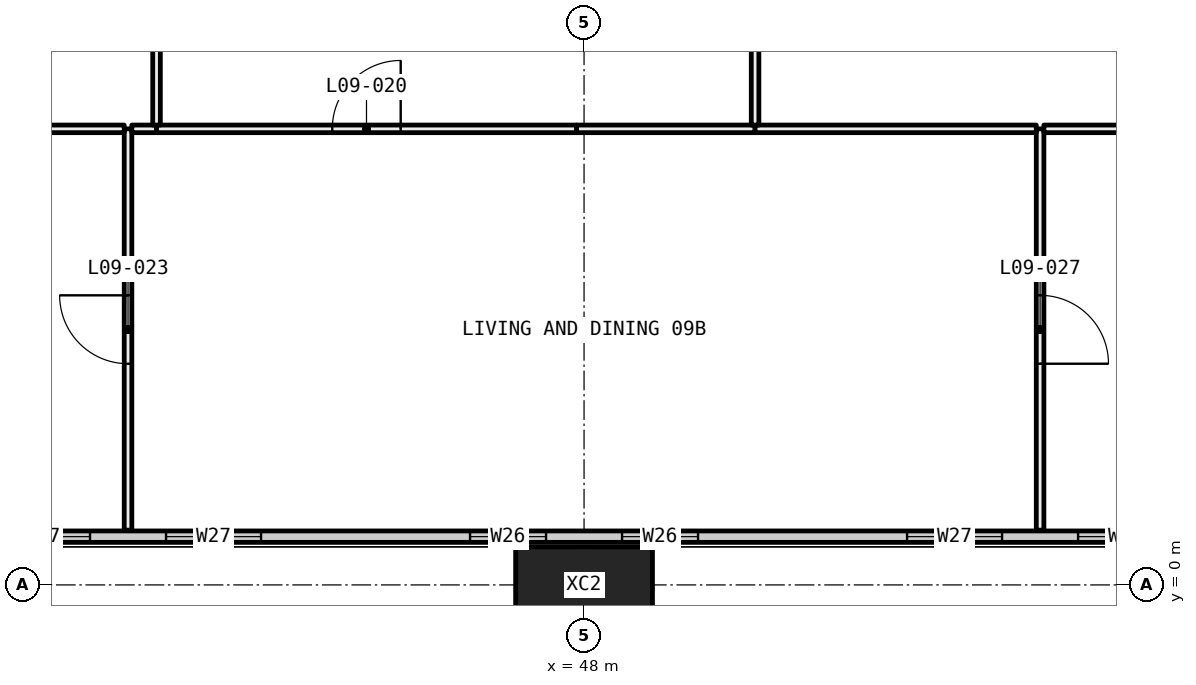
"""IFC4 building model, lengths in metres.
Left out: names, types, materials, properties, quantities, classifications, styles, units other than length and angle.
Written with IfcOpenShell. Run it as: python <this file> out.ifc"""

import sys

from ifc_helpers import new_model, si_unit, direction, frame, frame_2d, origin, origin_2d, place, context, subcontext, project, spatial, rectangle, hollow_rectangle, extrude, element, fill, save


model = new_model("IFC4")
c1 = context("Model", 3, precision=1e-05, world=origin(), true_north=direction((0.0, 1.0)))
c2 = subcontext(c1, "Body", "Model", "MODEL_VIEW")
j1 = project(units=[si_unit("LENGTHUNIT", "METRE"), si_unit("PLANEANGLEUNIT", "RADIAN")], contexts=[c1])
p1 = place(None, origin())
s1 = spatial("IfcSite", under=j1, at=p1, CompositionType="ELEMENT")
p2 = place(p1, origin())
s2 = spatial("IfcBuilding", under=s1, at=p2, CompositionType="ELEMENT")
p3 = place(p2, frame((0.0, 0.0, 43.8)))
s3 = spatial("IfcBuildingStorey", under=s2, at=p3, CompositionType="ELEMENT", Elevation=43.8)
p4 = place(p3, frame((48.0, 0.0, -0.4), z_axis=(0.0, 0.0, 1.0), x_axis=(1.0, 0.0, 0.0)))
e1 = element("IfcColumn", 1, at=p4, inside=s3, PredefinedType="COLUMN", context=c2, shape_type="SweptSolid", body=[
    extrude(hollow_rectangle(XDim=1.8, YDim=1.0, WallThickness=0.07, at=origin_2d()), origin(), (0.0, 0.0, 1.0), 3.45),
])
p5 = place(p3, frame((6.56, 0.635, 0.0), z_axis=(0.0, 0.0, 1.0), x_axis=(1.0, 0.0, 0.0)))
e2 = element("IfcWall", 2, at=p5, inside=s3, PredefinedType="ELEMENTEDWALL", context=c2, shape_type="SweptSolid", body=[
    extrude(rectangle(XDim=58.88, YDim=0.15, at=frame_2d((29.44, 0.0))), origin(), (0.0, 0.0, 1.0), 3.05),
])
p6 = place(p5, frame((0.44, 0.0, 0.45)))
e3 = element("IfcOpeningElement", 3, at=p6, cuts=e2, PredefinedType="OPENING", context=c2, shape_type="SweptSolid", body=[
    extrude(rectangle(XDim=4.5, YDim=2.55, at=frame_2d((2.25, 1.275))), frame((0.0, 0.085, 0.0), z_axis=(0.0, -1.0, 0.0), x_axis=(1.0, 0.0, 0.0)), (0.0, 0.0, 1.0), 0.17),
])
p7 = place(p5, frame((5.94, 0.0, 0.45)))
e4 = element("IfcOpeningElement", 4, at=p7, cuts=e2, PredefinedType="OPENING", context=c2, shape_type="SweptSolid", body=[
    extrude(rectangle(XDim=1.0, YDim=2.55, at=frame_2d((0.5, 1.275))), frame((0.0, 0.085, 0.0), z_axis=(0.0, -1.0, 0.0), x_axis=(1.0, 0.0, 0.0)), (0.0, 0.0, 1.0), 0.17),
])
p8 = place(p5, frame((9.69, 0.0, 0.45)))
e5 = element("IfcOpeningElement", 5, at=p8, cuts=e2, PredefinedType="OPENING", context=c2, shape_type="SweptSolid", body=[
    extrude(rectangle(XDim=1.25, YDim=2.55, at=frame_2d((0.625, 1.275))), frame((0.0, 0.085, 0.0), z_axis=(0.0, -1.0, 0.0), x_axis=(1.0, 0.0, 0.0)), (0.0, 0.0, 1.0), 0.17),
])
p9 = place(p5, frame((11.94, 0.0, 0.45)))
e6 = element("IfcOpeningElement", 6, at=p9, cuts=e2, PredefinedType="OPENING", context=c2, shape_type="SweptSolid", body=[
    extrude(rectangle(XDim=1.25, YDim=2.55, at=frame_2d((0.625, 1.275))), frame((0.0, 0.085, 0.0), z_axis=(0.0, -1.0, 0.0), x_axis=(1.0, 0.0, 0.0)), (0.0, 0.0, 1.0), 0.17),
])
p10 = place(p5, frame((15.94, 0.0, 0.45)))
e7 = element("IfcOpeningElement", 7, at=p10, cuts=e2, PredefinedType="OPENING", context=c2, shape_type="SweptSolid", body=[
    extrude(rectangle(XDim=1.0, YDim=2.55, at=frame_2d((0.5, 1.275))), frame((0.0, 0.085, 0.0), z_axis=(0.0, -1.0, 0.0), x_axis=(1.0, 0.0, 0.0)), (0.0, 0.0, 1.0), 0.17),
])
p11 = place(p5, frame((17.94, 0.0, 0.45)))
e8 = element("IfcOpeningElement", 8, at=p11, cuts=e2, PredefinedType="OPENING", context=c2, shape_type="SweptSolid", body=[
    extrude(rectangle(XDim=1.0, YDim=2.55, at=frame_2d((0.5, 1.275))), frame((0.0, 0.085, 0.0), z_axis=(0.0, -1.0, 0.0), x_axis=(1.0, 0.0, 0.0)), (0.0, 0.0, 1.0), 0.17),
])
p12 = place(p5, frame((21.69, 0.0, 0.45)))
e9 = element("IfcOpeningElement", 9, at=p12, cuts=e2, PredefinedType="OPENING", context=c2, shape_type="SweptSolid", body=[
    extrude(rectangle(XDim=1.25, YDim=2.55, at=frame_2d((0.625, 1.275))), frame((0.0, 0.085, 0.0), z_axis=(0.0, -1.0, 0.0), x_axis=(1.0, 0.0, 0.0)), (0.0, 0.0, 1.0), 0.17),
])
p13 = place(p5, frame((23.94, 0.0, 0.45)))
e10 = element("IfcOpeningElement", 10, at=p13, cuts=e2, PredefinedType="OPENING", context=c2, shape_type="SweptSolid", body=[
    extrude(rectangle(XDim=1.25, YDim=2.55, at=frame_2d((0.625, 1.275))), frame((0.0, 0.085, 0.0), z_axis=(0.0, -1.0, 0.0), x_axis=(1.0, 0.0, 0.0)), (0.0, 0.0, 1.0), 0.17),
])
p14 = place(p5, frame((27.94, 0.0, 0.45)))
e11 = element("IfcOpeningElement", 11, at=p14, cuts=e2, PredefinedType="OPENING", context=c2, shape_type="SweptSolid", body=[
    extrude(rectangle(XDim=1.0, YDim=2.55, at=frame_2d((0.5, 1.275))), frame((0.0, 0.085, 0.0), z_axis=(0.0, -1.0, 0.0), x_axis=(1.0, 0.0, 0.0)), (0.0, 0.0, 1.0), 0.17),
])
p15 = place(p5, frame((29.94, 0.0, 0.45)))
e12 = element("IfcOpeningElement", 12, at=p15, cuts=e2, PredefinedType="OPENING", context=c2, shape_type="SweptSolid", body=[
    extrude(rectangle(XDim=1.0, YDim=2.55, at=frame_2d((0.5, 1.275))), frame((0.0, 0.085, 0.0), z_axis=(0.0, -1.0, 0.0), x_axis=(1.0, 0.0, 0.0)), (0.0, 0.0, 1.0), 0.17),
])
p16 = place(p5, frame((33.69, 0.0, 0.45)))
e13 = element("IfcOpeningElement", 13, at=p16, cuts=e2, PredefinedType="OPENING", context=c2, shape_type="SweptSolid", body=[
    extrude(rectangle(XDim=1.25, YDim=2.55, at=frame_2d((0.625, 1.275))), frame((0.0, 0.085, 0.0), z_axis=(0.0, -1.0, 0.0), x_axis=(1.0, 0.0, 0.0)), (0.0, 0.0, 1.0), 0.17),
])
p17 = place(p5, frame((35.94, 0.0, 0.45)))
e14 = element("IfcOpeningElement", 14, at=p17, cuts=e2, PredefinedType="OPENING", context=c2, shape_type="SweptSolid", body=[
    extrude(rectangle(XDim=1.25, YDim=2.55, at=frame_2d((0.625, 1.275))), frame((0.0, 0.085, 0.0), z_axis=(0.0, -1.0, 0.0), x_axis=(1.0, 0.0, 0.0)), (0.0, 0.0, 1.0), 0.17),
])
p18 = place(p5, frame((39.94, 0.0, 0.45)))
e15 = element("IfcOpeningElement", 15, at=p18, cuts=e2, PredefinedType="OPENING", context=c2, shape_type="SweptSolid", body=[
    extrude(rectangle(XDim=1.0, YDim=2.55, at=frame_2d((0.5, 1.275))), frame((0.0, 0.085, 0.0), z_axis=(0.0, -1.0, 0.0), x_axis=(1.0, 0.0, 0.0)), (0.0, 0.0, 1.0), 0.17),
])
p19 = place(p5, frame((41.94, 0.0, 0.45)))
e16 = element("IfcOpeningElement", 16, at=p19, cuts=e2, PredefinedType="OPENING", context=c2, shape_type="SweptSolid", body=[
    extrude(rectangle(XDim=1.0, YDim=2.55, at=frame_2d((0.5, 1.275))), frame((0.0, 0.085, 0.0), z_axis=(0.0, -1.0, 0.0), x_axis=(1.0, 0.0, 0.0)), (0.0, 0.0, 1.0), 0.17),
])
p20 = place(p5, frame((45.69, 0.0, 0.45)))
e17 = element("IfcOpeningElement", 17, at=p20, cuts=e2, PredefinedType="OPENING", context=c2, shape_type="SweptSolid", body=[
    extrude(rectangle(XDim=1.25, YDim=2.55, at=frame_2d((0.625, 1.275))), frame((0.0, 0.085, 0.0), z_axis=(0.0, -1.0, 0.0), x_axis=(1.0, 0.0, 0.0)), (0.0, 0.0, 1.0), 0.17),
])
p21 = place(p5, frame((47.94, 0.0, 0.45)))
e18 = element("IfcOpeningElement", 18, at=p21, cuts=e2, PredefinedType="OPENING", context=c2, shape_type="SweptSolid", body=[
    extrude(rectangle(XDim=1.25, YDim=2.55, at=frame_2d((0.625, 1.275))), frame((0.0, 0.085, 0.0), z_axis=(0.0, -1.0, 0.0), x_axis=(1.0, 0.0, 0.0)), (0.0, 0.0, 1.0), 0.17),
])
p22 = place(p5, frame((51.94, 0.0, 0.45)))
e19 = element("IfcOpeningElement", 19, at=p22, cuts=e2, PredefinedType="OPENING", context=c2, shape_type="SweptSolid", body=[
    extrude(rectangle(XDim=1.0, YDim=2.55, at=frame_2d((0.5, 1.275))), frame((0.0, 0.085, 0.0), z_axis=(0.0, -1.0, 0.0), x_axis=(1.0, 0.0, 0.0)), (0.0, 0.0, 1.0), 0.17),
])
p23 = place(p5, frame((53.94, 0.0, 0.45)))
e20 = element("IfcOpeningElement", 20, at=p23, cuts=e2, PredefinedType="OPENING", context=c2, shape_type="SweptSolid", body=[
    extrude(rectangle(XDim=4.5, YDim=2.55, at=frame_2d((2.25, 1.275))), frame((0.0, 0.085, 0.0), z_axis=(0.0, -1.0, 0.0), x_axis=(1.0, 0.0, 0.0)), (0.0, 0.0, 1.0), 0.17),
])
p24 = place(p3, frame((42.0, 0.72, 0.0), z_axis=(0.0, 0.0, 1.0), x_axis=(0.0, 1.0, 0.0)))
e21 = element("IfcWall", 21, at=p24, inside=s3, PredefinedType="PARTITIONING", context=c2, shape_type="SweptSolid", body=[
    extrude(rectangle(XDim=5.28, YDim=0.1, at=frame_2d((2.64, 0.0))), origin(), (0.0, 0.0, 1.0), 3.05),
])
p25 = place(p24, frame((2.19, 0.0, 0.0)))
e22 = element("IfcOpeningElement", 22, at=p25, cuts=e21, PredefinedType="OPENING", context=c2, shape_type="SweptSolid", body=[
    extrude(rectangle(XDim=0.9, YDim=2.1, at=frame_2d((0.45, 1.05))), frame((0.0, 0.06, 0.0), z_axis=(0.0, -1.0, 0.0), x_axis=(1.0, 0.0, 0.0)), (0.0, 0.0, 1.0), 0.12),
])
p26 = place(p3, frame((41.95, 6.0, 0.0), z_axis=(0.0, 0.0, 1.0), x_axis=(-1.0, 0.0, 0.0)))
e23 = element("IfcWall", 23, at=p26, inside=s3, PredefinedType="PARTITIONING", context=c2, shape_type="SweptSolid", body=[
    extrude(rectangle(XDim=5.9, YDim=0.1, at=frame_2d((2.95, 0.0))), origin(), (0.0, 0.0, 1.0), 2.45),
])
p27 = place(p3, frame((54.0, 0.72, 0.0), z_axis=(0.0, 0.0, 1.0), x_axis=(0.0, 1.0, 0.0)))
e24 = element("IfcWall", 24, at=p27, inside=s3, PredefinedType="PARTITIONING", context=c2, shape_type="SweptSolid", body=[
    extrude(rectangle(XDim=5.28, YDim=0.1, at=frame_2d((2.64, 0.0))), origin(), (0.0, 0.0, 1.0), 3.05),
])
p28 = place(p27, frame((2.19, 0.0, 0.0)))
e25 = element("IfcOpeningElement", 25, at=p28, cuts=e24, PredefinedType="OPENING", context=c2, shape_type="SweptSolid", body=[
    extrude(rectangle(XDim=0.9, YDim=2.1, at=frame_2d((0.45, 1.05))), frame((0.0, 0.06, 0.0), z_axis=(0.0, -1.0, 0.0), x_axis=(1.0, 0.0, 0.0)), (0.0, 0.0, 1.0), 0.12),
])
p29 = place(p3, frame((42.375, 6.0, 0.0), z_axis=(0.0, 0.0, 1.0), x_axis=(-1.0, 0.0, 0.0)))
e26 = element("IfcWall", 26, at=p29, inside=s3, PredefinedType="PARTITIONING", context=c2, shape_type="SweptSolid", body=[
    extrude(rectangle(XDim=0.325, YDim=0.1, at=frame_2d((0.163, 0.0))), origin(), (0.0, 0.0, 1.0), 3.05),
])
p30 = place(p3, frame((50.25, 6.0, 0.0), z_axis=(0.0, 0.0, 1.0), x_axis=(-1.0, 0.0, 0.0)))
e27 = element("IfcWall", 27, at=p30, inside=s3, PredefinedType="PARTITIONING", context=c2, shape_type="SweptSolid", body=[
    extrude(rectangle(XDim=2.35, YDim=0.1, at=frame_2d((1.175, 0.0))), origin(), (0.0, 0.0, 1.0), 2.45),
])
p31 = place(p3, frame((47.9, 6.0, 0.0), z_axis=(0.0, 0.0, 1.0), x_axis=(-1.0, 0.0, 0.0)))
e28 = element("IfcWall", 28, at=p31, inside=s3, PredefinedType="PARTITIONING", context=c2, shape_type="SweptSolid", body=[
    extrude(rectangle(XDim=5.525, YDim=0.1, at=frame_2d((2.762, 0.0))), origin(), (0.0, 0.0, 1.0), 3.05),
])
p32 = place(p31, frame((2.312, 0.0, 0.0)))
e29 = element("IfcOpeningElement", 29, at=p32, cuts=e28, PredefinedType="OPENING", context=c2, shape_type="SweptSolid", body=[
    extrude(rectangle(XDim=0.9, YDim=2.1, at=frame_2d((0.45, 1.05))), frame((0.0, 0.06, 0.0), z_axis=(0.0, -1.0, 0.0), x_axis=(1.0, 0.0, 0.0)), (0.0, 0.0, 1.0), 0.12),
])
p33 = place(p3, frame((53.95, 6.0, 0.0), z_axis=(0.0, 0.0, 1.0), x_axis=(-1.0, 0.0, 0.0)))
e30 = element("IfcWall", 30, at=p33, inside=s3, PredefinedType="PARTITIONING", context=c2, shape_type="SweptSolid", body=[
    extrude(rectangle(XDim=3.7, YDim=0.1, at=frame_2d((1.85, 0.0))), origin(), (0.0, 0.0, 1.0), 3.05),
])
p34 = place(p3, frame((58.125, 6.0, 0.0), z_axis=(0.0, 0.0, 1.0), x_axis=(-1.0, 0.0, 0.0)))
e31 = element("IfcWall", 31, at=p34, inside=s3, PredefinedType="PARTITIONING", context=c2, shape_type="SweptSolid", body=[
    extrude(rectangle(XDim=4.075, YDim=0.1, at=frame_2d((2.038, 0.0))), origin(), (0.0, 0.0, 1.0), 3.05),
])
p35 = place(p3, frame((42.375, 6.05, 0.0), z_axis=(0.0, 0.0, 1.0), x_axis=(0.0, 1.0, 0.0)))
e32 = element("IfcWall", 32, at=p35, inside=s3, PredefinedType="PARTITIONING", context=c2, shape_type="SweptSolid", body=[
    extrude(rectangle(XDim=5.95, YDim=0.1, at=frame_2d((2.975, 0.0))), origin(), (0.0, 0.0, 1.0), 2.45),
])
p36 = place(p35, frame((2.525, 0.0, 0.0)))
e33 = element("IfcOpeningElement", 33, at=p36, cuts=e32, PredefinedType="OPENING", context=c2, shape_type="SweptSolid", body=[
    extrude(rectangle(XDim=0.9, YDim=2.1, at=frame_2d((0.45, 1.05))), frame((0.0, 0.06, 0.0), z_axis=(0.0, -1.0, 0.0), x_axis=(1.0, 0.0, 0.0)), (0.0, 0.0, 1.0), 0.12),
])
p37 = place(p3, frame((50.25, 6.05, 0.0), z_axis=(0.0, 0.0, 1.0), x_axis=(0.0, 1.0, 0.0)))
e34 = element("IfcWall", 34, at=p37, inside=s3, PredefinedType="PARTITIONING", context=c2, shape_type="SweptSolid", body=[
    extrude(rectangle(XDim=5.95, YDim=0.1, at=frame_2d((2.975, 0.0))), origin(), (0.0, 0.0, 1.0), 2.45),
])
p38 = place(p16, origin())
e35 = element("IfcWindow", 35, at=p38, inside=s3, PartitioningType="SINGLE_PANEL", PredefinedType="WINDOW", context=c2, shape_type="SweptSolid", body=[
    extrude(rectangle(XDim=1.25, YDim=2.55, at=frame_2d((0.625, 1.275))), frame((0.0, 0.03, 0.0), z_axis=(0.0, -1.0, 0.0), x_axis=(1.0, 0.0, 0.0)), (0.0, 0.0, 1.0), 0.06),
])
fill(e13, e35)
p39 = place(p17, origin())
e36 = element("IfcWindow", 36, at=p39, inside=s3, PartitioningType="SINGLE_PANEL", PredefinedType="WINDOW", context=c2, shape_type="SweptSolid", body=[
    extrude(rectangle(XDim=1.25, YDim=2.55, at=frame_2d((0.625, 1.275))), frame((0.0, 0.03, 0.0), z_axis=(0.0, -1.0, 0.0), x_axis=(1.0, 0.0, 0.0)), (0.0, 0.0, 1.0), 0.06),
])
fill(e14, e36)
p40 = place(p18, origin())
e37 = element("IfcWindow", 37, at=p40, inside=s3, PartitioningType="SINGLE_PANEL", PredefinedType="WINDOW", context=c2, shape_type="SweptSolid", body=[
    extrude(rectangle(XDim=1.0, YDim=2.55, at=frame_2d((0.5, 1.275))), frame((0.0, 0.03, 0.0), z_axis=(0.0, -1.0, 0.0), x_axis=(1.0, 0.0, 0.0)), (0.0, 0.0, 1.0), 0.06),
])
fill(e15, e37)
p41 = place(p19, origin())
e38 = element("IfcWindow", 38, at=p41, inside=s3, PartitioningType="SINGLE_PANEL", PredefinedType="WINDOW", context=c2, shape_type="SweptSolid", body=[
    extrude(rectangle(XDim=1.0, YDim=2.55, at=frame_2d((0.5, 1.275))), frame((0.0, 0.03, 0.0), z_axis=(0.0, -1.0, 0.0), x_axis=(1.0, 0.0, 0.0)), (0.0, 0.0, 1.0), 0.06),
])
fill(e16, e38)
p42 = place(p20, origin())
e39 = element("IfcWindow", 39, at=p42, inside=s3, PartitioningType="SINGLE_PANEL", PredefinedType="WINDOW", context=c2, shape_type="SweptSolid", body=[
    extrude(rectangle(XDim=1.25, YDim=2.55, at=frame_2d((0.625, 1.275))), frame((0.0, 0.03, 0.0), z_axis=(0.0, -1.0, 0.0), x_axis=(1.0, 0.0, 0.0)), (0.0, 0.0, 1.0), 0.06),
])
fill(e17, e39)
p43 = place(p21, origin())
e40 = element("IfcWindow", 40, at=p43, inside=s3, PartitioningType="SINGLE_PANEL", PredefinedType="WINDOW", context=c2, shape_type="SweptSolid", body=[
    extrude(rectangle(XDim=1.25, YDim=2.55, at=frame_2d((0.625, 1.275))), frame((0.0, 0.03, 0.0), z_axis=(0.0, -1.0, 0.0), x_axis=(1.0, 0.0, 0.0)), (0.0, 0.0, 1.0), 0.06),
])
fill(e18, e40)
p44 = place(p32, frame((0.9, 0.0, 0.0), x_axis=(-1.0, 0.0, 0.0)))
e41 = element("IfcDoor", 41, at=p44, inside=s3, OperationType="SINGLE_SWING_LEFT", PredefinedType="DOOR", context=c2, shape_type="SweptSolid", body=[
    extrude(rectangle(XDim=0.9, YDim=2.1, at=frame_2d((0.45, 1.05))), frame((0.0, 0.025, 0.0), z_axis=(0.0, -1.0, 0.0), x_axis=(1.0, 0.0, 0.0)), (0.0, 0.0, 1.0), 0.05),
])
fill(e29, e41)
p45 = place(p25, origin())
e42 = element("IfcDoor", 42, at=p45, inside=s3, OperationType="SINGLE_SWING_LEFT", PredefinedType="DOOR", context=c2, shape_type="SweptSolid", body=[
    extrude(rectangle(XDim=0.9, YDim=2.1, at=frame_2d((0.45, 1.05))), frame((0.0, 0.025, 0.0), z_axis=(0.0, -1.0, 0.0), x_axis=(1.0, 0.0, 0.0)), (0.0, 0.0, 1.0), 0.05),
])
fill(e22, e42)
p46 = place(p28, frame((0.9, 0.0, 0.0), x_axis=(-1.0, 0.0, 0.0)))
e43 = element("IfcDoor", 43, at=p46, inside=s3, OperationType="SINGLE_SWING_LEFT", PredefinedType="DOOR", context=c2, shape_type="SweptSolid", body=[
    extrude(rectangle(XDim=0.9, YDim=2.1, at=frame_2d((0.45, 1.05))), frame((0.0, 0.025, 0.0), z_axis=(0.0, -1.0, 0.0), x_axis=(1.0, 0.0, 0.0)), (0.0, 0.0, 1.0), 0.05),
])
fill(e25, e43)
save(model, sys.argv[1])
